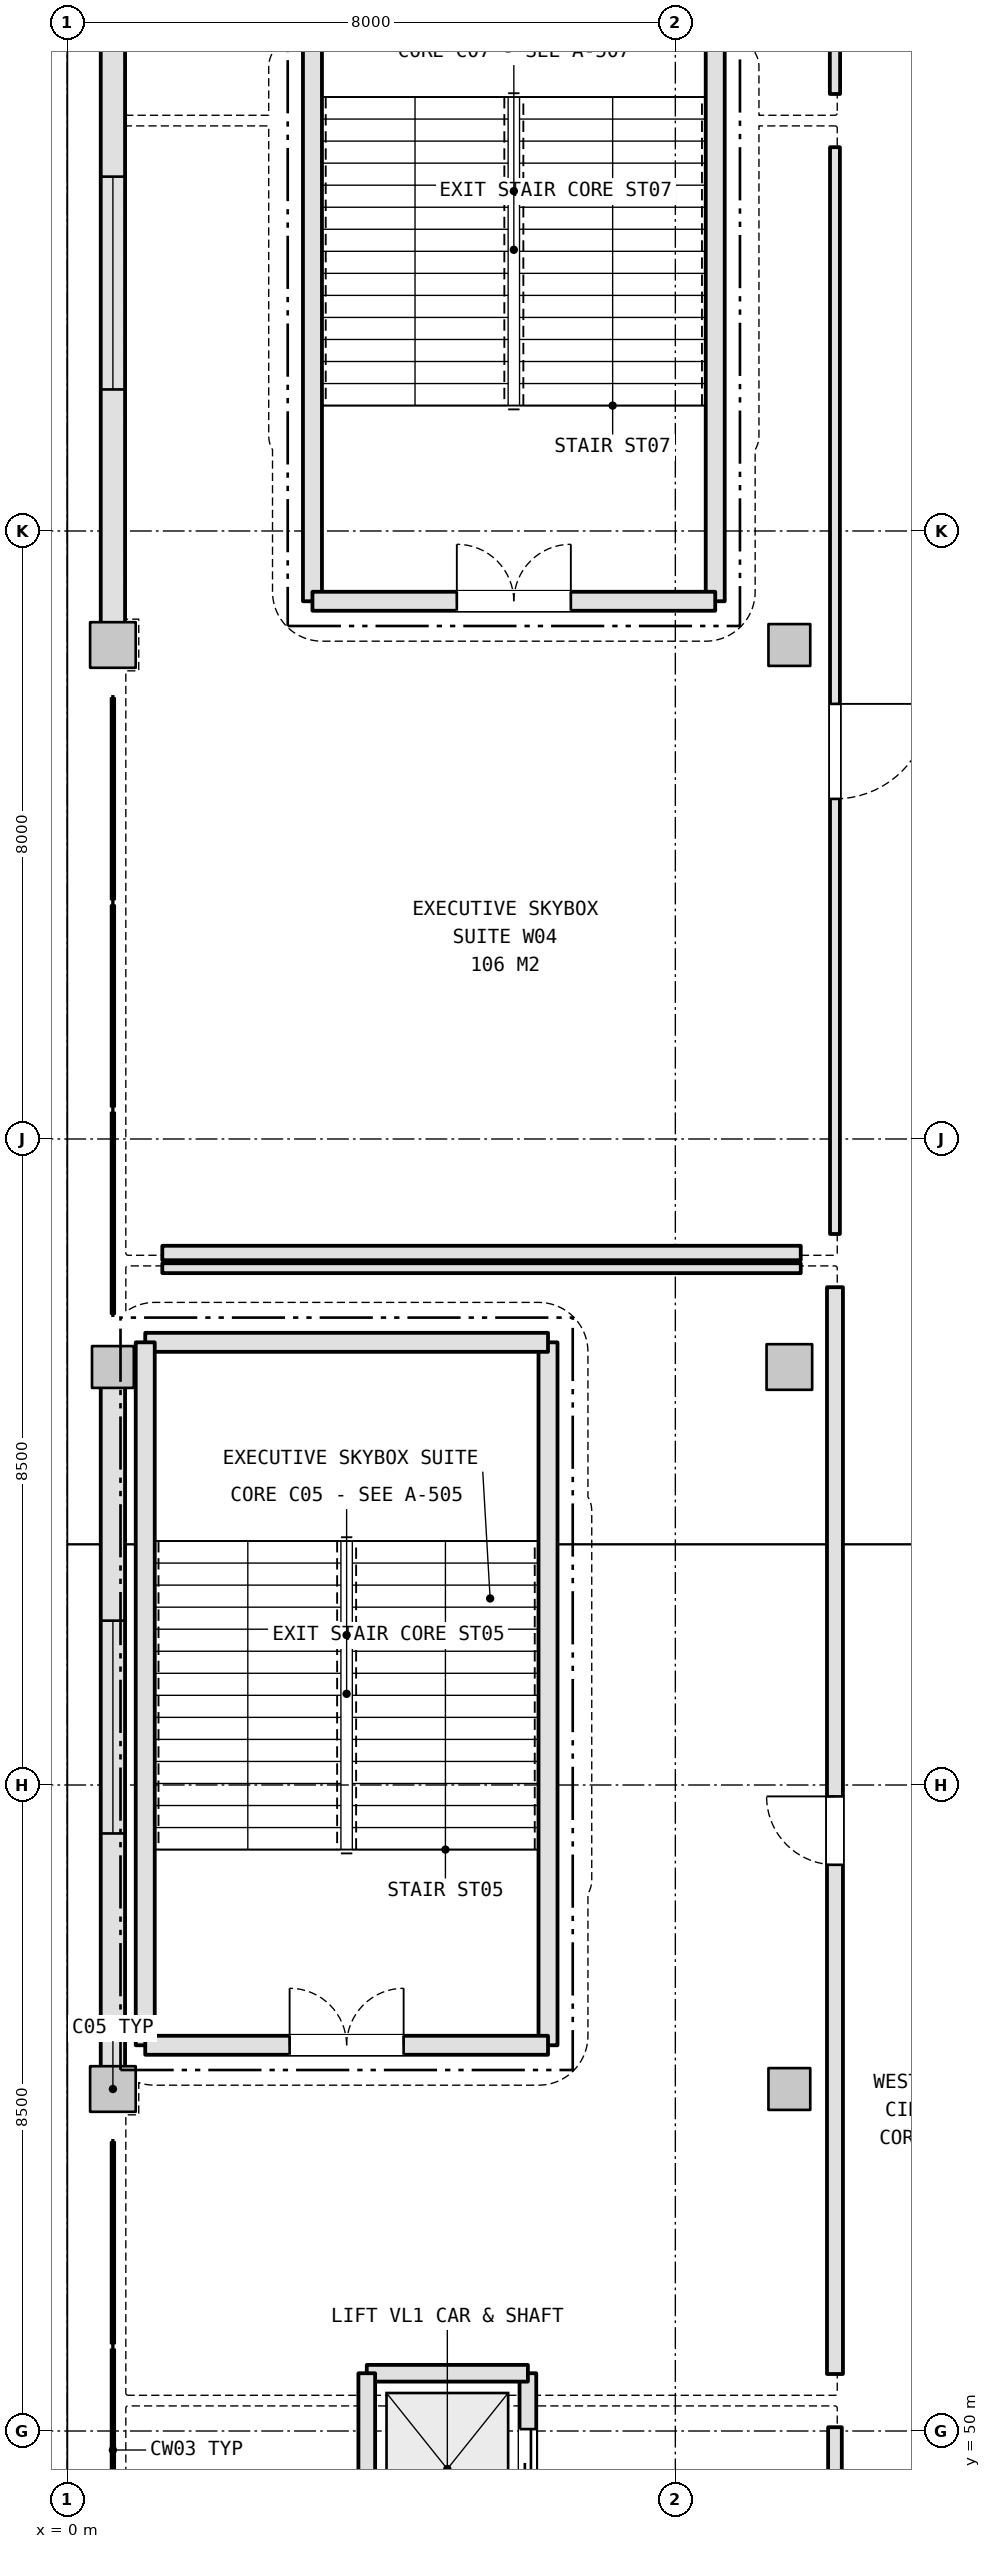
"""IFC4 building model, lengths in metres.
Left out: names, types, materials, properties, quantities, classifications, styles, units other than length and angle.
Written with IfcOpenShell. Run it as: python <this file> out.ifc"""

import sys

from ifc_helpers import new_model, si_unit, direction, frame, frame_2d, origin, origin_2d, place, context, subcontext, project, spatial, rectangle, extrude, element, fill, save


model = new_model("IFC4")
c1 = context("Model", 3, precision=1e-05, world=origin(), true_north=direction((0.0, 1.0)))
c2 = subcontext(c1, "Body", "Model", "MODEL_VIEW")
j1 = project(units=[si_unit("LENGTHUNIT", "METRE"), si_unit("PLANEANGLEUNIT", "RADIAN")], contexts=[c1])
p1 = place(None, origin())
s1 = spatial("IfcSite", under=j1, at=p1, CompositionType="ELEMENT")
p2 = place(p1, origin())
s2 = spatial("IfcBuilding", under=s1, at=p2, CompositionType="ELEMENT")
p3 = place(p2, frame((0.0, 0.0, 16.2)))
s3 = spatial("IfcBuildingStorey", under=s2, at=p3, CompositionType="ELEMENT", Elevation=16.2)
p4 = place(p3, frame((0.6, 54.5, 0.0), z_axis=(0.0, 0.0, 1.0), x_axis=(1.0, 0.0, 0.0)))
e1 = element("IfcColumn", 1, at=p4, inside=s3, PredefinedType="COLUMN", context=c2, shape_type="SweptSolid", body=[
    extrude(rectangle(XDim=0.6, YDim=0.6, at=origin_2d()), origin(), (0.0, 0.0, 1.0), 5.4),
])
p5 = place(p3, frame((0.6, 64.0, 0.0), z_axis=(0.0, 0.0, 1.0), x_axis=(1.0, 0.0, 0.0)))
e2 = element("IfcColumn", 2, at=p5, inside=s3, PredefinedType="COLUMN", context=c2, shape_type="SweptSolid", body=[
    extrude(rectangle(XDim=0.55, YDim=0.55, at=origin_2d()), origin(), (0.0, 0.0, 1.0), 5.4),
])
p6 = place(p3, frame((0.6, 73.5, 0.0), z_axis=(0.0, 0.0, 1.0), x_axis=(1.0, 0.0, 0.0)))
e3 = element("IfcColumn", 3, at=p6, inside=s3, PredefinedType="COLUMN", context=c2, shape_type="SweptSolid", body=[
    extrude(rectangle(XDim=0.6, YDim=0.6, at=origin_2d()), origin(), (0.0, 0.0, 1.0), 5.4),
])
p7 = place(p3, frame((9.5, 54.5, 0.0), z_axis=(0.0, 0.0, 1.0), x_axis=(1.0, 0.0, 0.0)))
e4 = element("IfcColumn", 4, at=p7, inside=s3, PredefinedType="COLUMN", context=c2, shape_type="SweptSolid", body=[
    extrude(rectangle(XDim=0.55, YDim=0.55, at=origin_2d()), origin(), (0.0, 0.0, 1.0), 5.4),
])
p8 = place(p3, frame((9.5, 64.0, 0.0), z_axis=(0.0, 0.0, 1.0), x_axis=(1.0, 0.0, 0.0)))
e5 = element("IfcColumn", 5, at=p8, inside=s3, PredefinedType="COLUMN", context=c2, shape_type="SweptSolid", body=[
    extrude(rectangle(XDim=0.6, YDim=0.6, at=origin_2d()), origin(), (0.0, 0.0, 1.0), 5.4),
])
p9 = place(p3, frame((9.5, 73.5, 0.0), z_axis=(0.0, 0.0, 1.0), x_axis=(1.0, 0.0, 0.0)))
e6 = element("IfcColumn", 6, at=p9, inside=s3, PredefinedType="COLUMN", context=c2, shape_type="SweptSolid", body=[
    extrude(rectangle(XDim=0.55, YDim=0.55, at=origin_2d()), origin(), (0.0, 0.0, 1.0), 5.4),
])
p10 = place(p3, frame((0.6, 54.788, 0.0), z_axis=(0.0, 0.0, 1.0), x_axis=(0.0, 1.0, 0.0)))
e7 = element("IfcWall", 7, at=p10, inside=s3, PredefinedType="SOLIDWALL", context=c2, shape_type="SweptSolid", body=[
    extrude(rectangle(XDim=8.949, YDim=0.32, at=frame_2d((4.475, 0.0))), origin(), (0.0, 0.0, 1.0), 4.475),
])
p11 = place(p10, frame((3.074, 0.0, 1.05)))
e8 = element("IfcOpeningElement", 8, at=p11, cuts=e7, PredefinedType="OPENING", context=c2, shape_type="SweptSolid", body=[
    extrude(rectangle(XDim=2.8, YDim=1.4, at=frame_2d((1.4, 0.7))), frame((0.0, 0.17, 0.0), z_axis=(0.0, -1.0, 0.0), x_axis=(1.0, 0.0, 0.0)), (0.0, 0.0, 1.0), 0.34),
])
p12 = place(p3, frame((0.6, 73.788, 0.0), z_axis=(0.0, 0.0, 1.0), x_axis=(0.0, 1.0, 0.0)))
e9 = element("IfcWall", 9, at=p12, inside=s3, PredefinedType="SOLIDWALL", context=c2, shape_type="SweptSolid", body=[
    extrude(rectangle(XDim=8.949, YDim=0.32, at=frame_2d((4.475, 0.0))), origin(), (0.0, 0.0, 1.0), 4.475),
])
p13 = place(p12, frame((3.074, 0.0, 1.05)))
e10 = element("IfcOpeningElement", 10, at=p13, cuts=e9, PredefinedType="OPENING", context=c2, shape_type="SweptSolid", body=[
    extrude(rectangle(XDim=2.8, YDim=1.4, at=frame_2d((1.4, 0.7))), frame((0.0, 0.17, 0.0), z_axis=(0.0, -1.0, 0.0), x_axis=(1.0, 0.0, 0.0)), (0.0, 0.0, 1.0), 0.34),
])
p14 = place(p3, frame((6.325, 55.075, 0.0), z_axis=(0.0, 0.0, 1.0), x_axis=(0.0, 1.0, 0.0)))
e11 = element("IfcWall", 11, at=p14, inside=s3, PredefinedType="SHEAR", context=c2, shape_type="SweptSolid", body=[
    extrude(rectangle(XDim=9.249, YDim=0.25, at=frame_2d((4.625, 0.0))), origin(), (0.0, 0.0, 1.0), 5.14),
])
p15 = place(p3, frame((6.325, 64.325, 0.0), z_axis=(0.0, 0.0, 1.0), x_axis=(-1.0, 0.0, 0.0)))
e12 = element("IfcWall", 12, at=p15, inside=s3, PredefinedType="SHEAR", context=c2, shape_type="SweptSolid", body=[
    extrude(rectangle(XDim=5.299, YDim=0.25, at=frame_2d((2.65, 0.0))), origin(), (0.0, 0.0, 1.0), 5.14),
])
p16 = place(p3, frame((1.025, 64.325, 0.0), z_axis=(0.0, 0.0, 1.0), x_axis=(0.0, -1.0, 0.0)))
e13 = element("IfcWall", 13, at=p16, inside=s3, PredefinedType="SHEAR", context=c2, shape_type="SweptSolid", body=[
    extrude(rectangle(XDim=9.249, YDim=0.25, at=frame_2d((4.625, 0.0))), origin(), (0.0, 0.0, 1.0), 5.14),
])
p17 = place(p3, frame((1.025, 55.075, 0.0), z_axis=(0.0, 0.0, 1.0), x_axis=(1.0, 0.0, 0.0)))
e14 = element("IfcWall", 14, at=p17, inside=s3, PredefinedType="SHEAR", context=c2, shape_type="SweptSolid", body=[
    extrude(rectangle(XDim=5.299, YDim=0.25, at=frame_2d((2.65, 0.0))), origin(), (0.0, 0.0, 1.0), 5.14),
])
p18 = place(p17, frame((1.9, 0.0, 0.0)))
e15 = element("IfcOpeningElement", 15, at=p18, cuts=e14, PredefinedType="OPENING", context=c2, shape_type="SweptSolid", body=[
    extrude(rectangle(XDim=1.5, YDim=2.2, at=frame_2d((0.75, 1.1))), frame((0.0, 0.135, 0.0), z_axis=(0.0, -1.0, 0.0), x_axis=(1.0, 0.0, 0.0)), (0.0, 0.0, 1.0), 0.27),
])
for number, where, z_axis, x_axis in (
    (16, (8.525, 74.075, 0.0), (0.0, 0.0, 1.0), (0.0, 1.0, 0.0)),
    (17, (3.225, 83.325, 0.0), (0.0, 0.0, 1.0), (0.0, -1.0, 0.0)),
):
    element("IfcWall", number, at=place(p3, frame(where, z_axis=z_axis, x_axis=x_axis)), inside=s3, PredefinedType="SHEAR", context=c2, shape_type="SweptSolid", body=[
        extrude(rectangle(XDim=9.249, YDim=0.25, at=frame_2d((4.625, 0.0))), origin(), (0.0, 0.0, 1.0), 5.14),
    ])
p19 = place(p3, frame((3.225, 74.075, 0.0), z_axis=(0.0, 0.0, 1.0), x_axis=(1.0, 0.0, 0.0)))
e18 = element("IfcWall", 18, at=p19, inside=s3, PredefinedType="SHEAR", context=c2, shape_type="SweptSolid", body=[
    extrude(rectangle(XDim=5.299, YDim=0.25, at=frame_2d((2.65, 0.0))), origin(), (0.0, 0.0, 1.0), 5.14),
])
p20 = place(p19, frame((1.9, 0.0, 0.0)))
e19 = element("IfcOpeningElement", 19, at=p20, cuts=e18, PredefinedType="OPENING", context=c2, shape_type="SweptSolid", body=[
    extrude(rectangle(XDim=1.5, YDim=2.2, at=frame_2d((0.75, 1.1))), frame((0.0, 0.135, 0.0), z_axis=(0.0, -1.0, 0.0), x_axis=(1.0, 0.0, 0.0)), (0.0, 0.0, 1.0), 0.27),
])
p21 = place(p3, frame((6.06, 48.24, 0.0), z_axis=(0.0, 0.0, 1.0), x_axis=(0.0, 1.0, 0.0)))
e20 = element("IfcWall", 20, at=p21, inside=s3, PredefinedType="SHEAR", context=c2, shape_type="SweptSolid", body=[
    extrude(rectangle(XDim=2.52, YDim=0.22, at=frame_2d((1.26, 0.0))), origin(), (0.0, 0.0, 1.0), 5.14),
])
p22 = place(p21, frame((0.735, 0.0, 0.0)))
e21 = element("IfcOpeningElement", 21, at=p22, cuts=e20, PredefinedType="OPENING", context=c2, shape_type="SweptSolid", body=[
    extrude(rectangle(XDim=1.05, YDim=2.15, at=frame_2d((0.525, 1.075))), frame((0.0, 0.12, 0.0), z_axis=(0.0, -1.0, 0.0), x_axis=(1.0, 0.0, 0.0)), (0.0, 0.0, 1.0), 0.24),
])
p23 = place(p3, frame((6.06, 50.76, 0.0), z_axis=(0.0, 0.0, 1.0), x_axis=(-1.0, 0.0, 0.0)))
e22 = element("IfcWall", 22, at=p23, inside=s3, PredefinedType="SHEAR", context=c2, shape_type="SweptSolid", body=[
    extrude(rectangle(XDim=2.12, YDim=0.22, at=frame_2d((1.06, 0.0))), origin(), (0.0, 0.0, 1.0), 5.14),
])
p24 = place(p3, frame((3.94, 50.76, 0.0), z_axis=(0.0, 0.0, 1.0), x_axis=(0.0, -1.0, 0.0)))
e23 = element("IfcWall", 23, at=p24, inside=s3, PredefinedType="SHEAR", context=c2, shape_type="SweptSolid", body=[
    extrude(rectangle(XDim=2.52, YDim=0.22, at=frame_2d((1.26, 0.0))), origin(), (0.0, 0.0, 1.0), 5.14),
])
p25 = place(p3, frame((10.1, 50.05, 0.0), z_axis=(0.0, 0.0, 1.0), x_axis=(0.0, -1.0, 0.0)))
e24 = element("IfcWall", 24, at=p25, inside=s3, PredefinedType="PARTITIONING", context=c2, shape_type="SweptSolid", body=[
    extrude(rectangle(XDim=14.3, YDim=0.18, at=frame_2d((7.15, 0.0))), origin(), (0.0, 0.0, 1.0), 4.668),
])
p26 = place(p25, frame((6.25, 0.0, 0.0)))
e25 = element("IfcOpeningElement", 25, at=p26, cuts=e24, PredefinedType="OPENING", context=c2, shape_type="SweptSolid", body=[
    extrude(rectangle(XDim=1.8, YDim=2.2, at=frame_2d((0.9, 1.1))), frame((0.0, 0.1, 0.0), z_axis=(0.0, -1.0, 0.0), x_axis=(1.0, 0.0, 0.0)), (0.0, 0.0, 1.0), 0.2),
])
p27 = place(p3, frame((10.1, 65.05, 0.0), z_axis=(0.0, 0.0, 1.0), x_axis=(0.0, -1.0, 0.0)))
e26 = element("IfcWall", 26, at=p27, inside=s3, PredefinedType="PLUMBINGWALL", context=c2, shape_type="SweptSolid", body=[
    extrude(rectangle(XDim=14.3, YDim=0.21, at=frame_2d((7.15, 0.0))), origin(), (0.0, 0.0, 1.0), 4.668),
])
p28 = place(p27, frame((6.7, 0.0, 0.0)))
e27 = element("IfcOpeningElement", 27, at=p28, cuts=e26, PredefinedType="OPENING", context=c2, shape_type="SweptSolid", body=[
    extrude(rectangle(XDim=0.9, YDim=2.1, at=frame_2d((0.45, 1.05))), frame((0.0, 0.115, 0.0), z_axis=(0.0, -1.0, 0.0), x_axis=(1.0, 0.0, 0.0)), (0.0, 0.0, 1.0), 0.23),
])
p29 = place(p3, frame((1.25, 65.3, 0.0), z_axis=(0.0, 0.0, 1.0), x_axis=(1.0, 0.0, 0.0)))
e28 = element("IfcWall", 28, at=p29, inside=s3, PredefinedType="PARTITIONING", context=c2, shape_type="SweptSolid", body=[
    extrude(rectangle(XDim=8.4, YDim=0.13, at=frame_2d((4.2, 0.0))), origin(), (0.0, 0.0, 1.0), 4.475),
])
p30 = place(p3, frame((10.1, 80.05, 0.0), z_axis=(0.0, 0.0, 1.0), x_axis=(0.0, -1.0, 0.0)))
e29 = element("IfcWall", 29, at=p30, inside=s3, PredefinedType="PARTITIONING", context=c2, shape_type="SweptSolid", body=[
    extrude(rectangle(XDim=14.3, YDim=0.13, at=frame_2d((7.15, 0.0))), origin(), (0.0, 0.0, 1.0), 4.668),
])
p31 = place(p30, frame((7.325, 0.0, 0.0)))
e30 = element("IfcOpeningElement", 30, at=p31, cuts=e29, PredefinedType="OPENING", context=c2, shape_type="SweptSolid", body=[
    extrude(rectangle(XDim=1.25, YDim=2.2, at=frame_2d((0.625, 1.1))), frame((0.0, 0.075, 0.0), z_axis=(0.0, -1.0, 0.0), x_axis=(1.0, 0.0, 0.0)), (0.0, 0.0, 1.0), 0.15),
])
p32 = place(p3, frame((9.65, 65.5, 0.0), z_axis=(0.0, 0.0, 1.0), x_axis=(-1.0, 0.0, 0.0)))
e31 = element("IfcWall", 31, at=p32, inside=s3, PredefinedType="PARTITIONING", context=c2, shape_type="SweptSolid", body=[
    extrude(rectangle(XDim=8.4, YDim=0.19, at=frame_2d((4.2, 0.0))), origin(), (0.0, 0.0, 1.0), 4.475),
])
p33 = place(p3, frame((10.1, 91.51, 0.0), z_axis=(0.0, 0.0, 1.0), x_axis=(0.0, -1.0, 0.0)))
e32 = element("IfcWall", 32, at=p33, inside=s3, PredefinedType="PARTITIONING", context=c2, shape_type="SweptSolid", body=[
    extrude(rectangle(XDim=10.76, YDim=0.135, at=frame_2d((5.38, 0.0))), origin(), (0.0, 0.0, 1.0), 4.668),
])
p34 = place(p33, frame((4.9, 0.0, 0.0)))
e33 = element("IfcOpeningElement", 33, at=p34, cuts=e32, PredefinedType="OPENING", context=c2, shape_type="SweptSolid", body=[
    extrude(rectangle(XDim=0.96, YDim=2.15, at=frame_2d((0.48, 1.075))), frame((0.0, 0.077, 0.0), z_axis=(0.0, -1.0, 0.0), x_axis=(1.0, 0.0, 0.0)), (0.0, 0.0, 1.0), 0.155),
])
p35 = place(p11, origin())
e34 = element("IfcWindow", 34, at=p35, inside=s3, PartitioningType="SINGLE_PANEL", PredefinedType="WINDOW", context=c2, shape_type="SweptSolid", body=[
    extrude(rectangle(XDim=2.8, YDim=1.4, at=frame_2d((1.4, 0.7))), frame((0.0, 0.03, 0.0), z_axis=(0.0, -1.0, 0.0), x_axis=(1.0, 0.0, 0.0)), (0.0, 0.0, 1.0), 0.06),
])
fill(e8, e34)
p36 = place(p13, origin())
e35 = element("IfcWindow", 35, at=p36, inside=s3, PartitioningType="SINGLE_PANEL", PredefinedType="WINDOW", context=c2, shape_type="SweptSolid", body=[
    extrude(rectangle(XDim=2.8, YDim=1.4, at=frame_2d((1.4, 0.7))), frame((0.0, 0.03, 0.0), z_axis=(0.0, -1.0, 0.0), x_axis=(1.0, 0.0, 0.0)), (0.0, 0.0, 1.0), 0.06),
])
fill(e10, e35)
p37 = place(p18, origin())
e36 = element("IfcDoor", 36, at=p37, inside=s3, OperationType="DOUBLE_DOOR_SINGLE_SWING", PredefinedType="DOOR", context=c2, shape_type="SweptSolid", body=[
    extrude(rectangle(XDim=1.5, YDim=2.2, at=frame_2d((0.75, 1.1))), frame((0.0, 0.025, 0.0), z_axis=(0.0, -1.0, 0.0), x_axis=(1.0, 0.0, 0.0)), (0.0, 0.0, 1.0), 0.05),
])
fill(e15, e36)
p38 = place(p20, origin())
e37 = element("IfcDoor", 37, at=p38, inside=s3, OperationType="DOUBLE_DOOR_SINGLE_SWING", PredefinedType="DOOR", context=c2, shape_type="SweptSolid", body=[
    extrude(rectangle(XDim=1.5, YDim=2.2, at=frame_2d((0.75, 1.1))), frame((0.0, 0.025, 0.0), z_axis=(0.0, -1.0, 0.0), x_axis=(1.0, 0.0, 0.0)), (0.0, 0.0, 1.0), 0.05),
])
fill(e19, e37)
p39 = place(p22, origin())
e38 = element("IfcDoor", 38, at=p39, inside=s3, OperationType="DOUBLE_DOOR_SLIDING", PredefinedType="DOOR", context=c2, shape_type="SweptSolid", body=[
    extrude(rectangle(XDim=1.05, YDim=2.15, at=frame_2d((0.525, 1.075))), frame((0.0, 0.025, 0.0), z_axis=(0.0, -1.0, 0.0), x_axis=(1.0, 0.0, 0.0)), (0.0, 0.0, 1.0), 0.05),
])
fill(e21, e38)
p40 = place(p28, frame((0.9, 0.0, 0.0), z_axis=(0.0, 0.0, 1.0), x_axis=(-1.0, 0.0, 0.0)))
e39 = element("IfcDoor", 39, at=p40, inside=s3, OperationType="SINGLE_SWING_LEFT", PredefinedType="DOOR", context=c2, shape_type="SweptSolid", body=[
    extrude(rectangle(XDim=0.9, YDim=2.1, at=frame_2d((0.45, 1.05))), frame((0.0, 0.025, 0.0), z_axis=(0.0, -1.0, 0.0), x_axis=(1.0, 0.0, 0.0)), (0.0, 0.0, 1.0), 0.05),
])
fill(e27, e39)
p41 = place(p31, origin())
e40 = element("IfcDoor", 40, at=p41, inside=s3, OperationType="SINGLE_SWING_LEFT", PredefinedType="DOOR", context=c2, shape_type="SweptSolid", body=[
    extrude(rectangle(XDim=1.25, YDim=2.2, at=frame_2d((0.625, 1.1))), frame((0.0, 0.025, 0.0), z_axis=(0.0, -1.0, 0.0), x_axis=(1.0, 0.0, 0.0)), (0.0, 0.0, 1.0), 0.05),
])
fill(e30, e40)
save(model, sys.argv[1])
